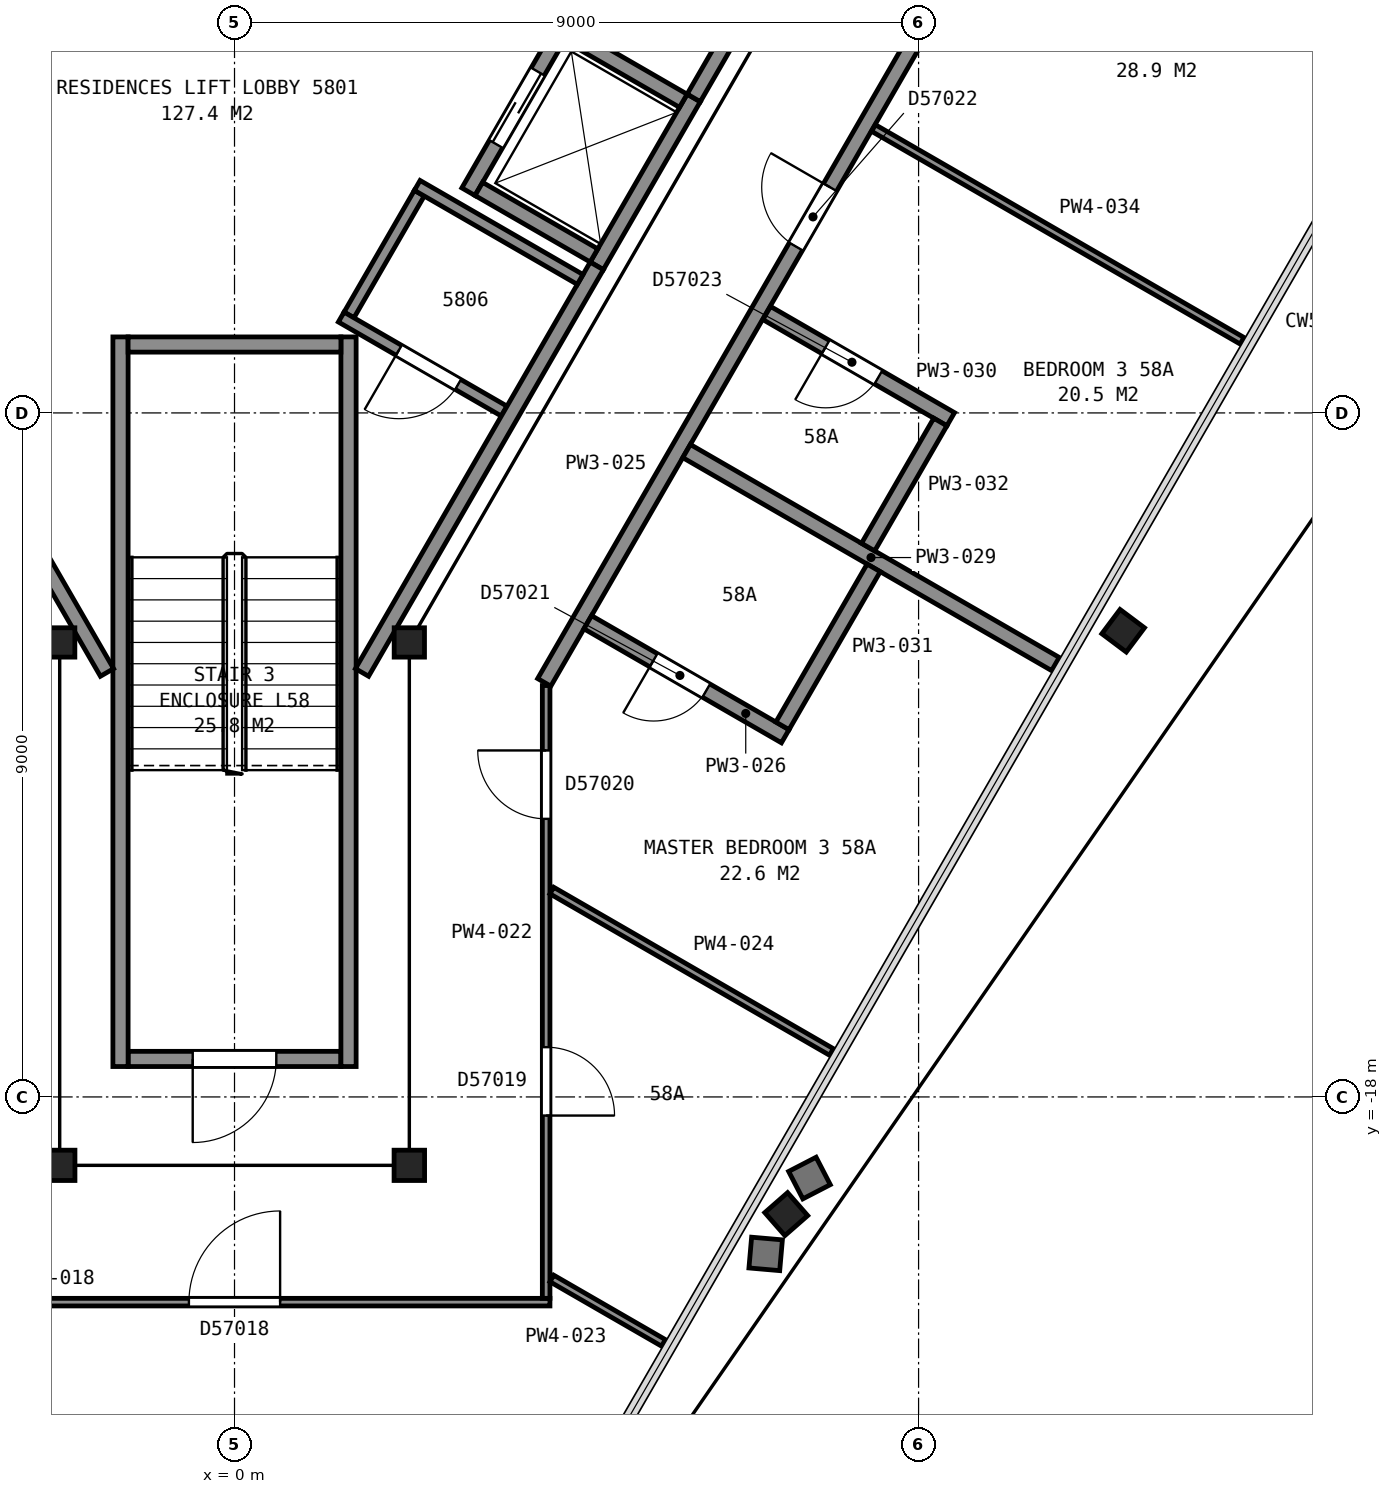
"""IFC4 building model, lengths in metres.
Left out: names, types, materials, properties, quantities, classifications, styles, units other than length and angle.
Written with IfcOpenShell. Run it as: python <this file> out.ifc"""

import sys

from ifc_helpers import new_model, si_unit, direction, frame, frame_2d, origin, origin_2d, place, context, subcontext, project, spatial, rectangle, i_section, extrude, element, fill, save


model = new_model("IFC4")
c1 = context("Model", 3, precision=1e-05, world=origin(), true_north=direction((0.0, 1.0)))
c2 = subcontext(c1, "Body", "Model", "MODEL_VIEW")
j1 = project(units=[si_unit("LENGTHUNIT", "METRE"), si_unit("PLANEANGLEUNIT", "RADIAN")], contexts=[c1])
p1 = place(None, origin())
s1 = spatial("IfcSite", under=j1, at=p1, CompositionType="ELEMENT")
p2 = place(p1, origin())
s2 = spatial("IfcBuilding", under=s1, at=p2, CompositionType="ELEMENT")
p3 = place(p2, frame((0.0, 0.0, 232.3)))
s3 = spatial("IfcBuildingStorey", under=s2, at=p3, CompositionType="ELEMENT", Elevation=232.3)
p4 = place(p3, frame((7.104, -19.365, 0.035), z_axis=(0.129888053343, -0.148415232525, 0.98035810414), x_axis=(-0.498873509398, -0.864253236346, -0.064742297498)))
e1 = element("IfcColumn", 1, at=p4, inside=s3, PredefinedType="COLUMN", context=c2, shape_type="SweptSolid", body=[
    extrude(i_section(OverallWidth=0.401, OverallDepth=0.399, WebThickness=0.025, FlangeThickness=0.04, FilletRadius=0.015, at=origin_2d()), origin(), (0.0, 0.0, 1.0), 3.703),
])
p5 = place(p3, frame((11.515, -11.734, 0.035), z_axis=(0.148684508118, -0.11154642209, 0.982573311649), x_axis=(-0.499994347872, -0.865733149293, -0.022622252559)))
e2 = element("IfcColumn", 2, at=p5, inside=s3, PredefinedType="COLUMN", context=c2, shape_type="SweptSolid", body=[
    extrude(i_section(OverallWidth=0.401, OverallDepth=0.399, WebThickness=0.025, FlangeThickness=0.04, FilletRadius=0.015, at=origin_2d()), origin(), (0.0, 0.0, 1.0), 3.695),
])
p6 = place(p3, frame((-2.3, -12.02, 0.0), z_axis=(0.0, 0.0, 1.0), x_axis=(1.0, 0.0, 0.0)))
e3 = element("IfcColumn", 3, at=p6, inside=s3, PredefinedType="COLUMN", context=c2, shape_type="SweptSolid", body=[
    extrude(i_section(OverallWidth=0.399, OverallDepth=0.386, WebThickness=0.021, FlangeThickness=0.033, FilletRadius=0.015, at=origin_2d()), origin(), (0.0, 0.0, 1.0), 3.7),
])
for number, where, z_axis, x_axis in (
    (4, (-2.3, -18.9, 0.0), (0.0, 0.0, 1.0), (-1.0, 0.0, 0.0)),
    (5, (2.3, -18.9, 0.0), (0.0, 0.0, 1.0), (-1.0, 0.0, 0.0)),
):
    element("IfcColumn", number, at=place(p3, frame(where, z_axis=z_axis, x_axis=x_axis)), inside=s3, PredefinedType="COLUMN", context=c2, shape_type="SweptSolid", body=[
        extrude(i_section(OverallWidth=0.401, OverallDepth=0.399, WebThickness=0.025, FlangeThickness=0.04, FilletRadius=0.015, at=origin_2d()), origin(), (0.0, 0.0, 1.0), 3.7),
    ])
p7 = place(p3, frame((2.3, -12.02, 0.0), z_axis=(0.0, 0.0, 1.0), x_axis=(1.0, 0.0, 0.0)))
e6 = element("IfcColumn", 6, at=p7, inside=s3, PredefinedType="COLUMN", context=c2, shape_type="SweptSolid", body=[
    extrude(i_section(OverallWidth=0.399, OverallDepth=0.386, WebThickness=0.021, FlangeThickness=0.033, FilletRadius=0.015, at=origin_2d()), origin(), (0.0, 0.0, 1.0), 3.7),
])
p8 = place(p3, frame((-1.4, -17.5, 0.0), z_axis=(0.0, 0.0, 1.0), x_axis=(1.0, 0.0, 0.0)))
e7 = element("IfcWall", 7, at=p8, inside=s3, PredefinedType="PARTITIONING", context=c2, shape_type="SweptSolid", body=[
    extrude(rectangle(XDim=2.8, YDim=0.2, at=frame_2d((1.4, 0.0))), origin(), (0.0, 0.0, 1.0), 3.45),
])
p9 = place(p8, frame((0.85, 0.0, 0.0)))
e8 = element("IfcOpeningElement", 8, at=p9, cuts=e7, PredefinedType="OPENING", context=c2, shape_type="SweptSolid", body=[
    extrude(rectangle(XDim=1.1, YDim=2.1, at=frame_2d((0.55, 1.05))), frame((0.0, 0.11, 0.0), z_axis=(0.0, -1.0, 0.0), x_axis=(1.0, 0.0, 0.0)), (0.0, 0.0, 1.0), 0.22),
])
for number, where, z_axis, x_axis in (
    (9, (1.5, -8.0, 0.0), (0.0, 0.0, 1.0), (0.0, -1.0, 0.0)),
    (10, (-1.5, -8.0, 0.0), (0.0, 0.0, 1.0), (0.0, -1.0, 0.0)),
):
    element("IfcWall", number, at=place(p3, frame(where, z_axis=z_axis, x_axis=x_axis)), inside=s3, PredefinedType="PARTITIONING", context=c2, shape_type="SweptSolid", body=[
        extrude(rectangle(XDim=9.6, YDim=0.2, at=frame_2d((4.8, 0.0))), origin(), (0.0, 0.0, 1.0), 3.45),
    ])
p10 = place(p3, frame((-1.4, -8.1, 0.0), z_axis=(0.0, 0.0, 1.0), x_axis=(1.0, 0.0, 0.0)))
e11 = element("IfcWall", 11, at=p10, inside=s3, PredefinedType="PARTITIONING", context=c2, shape_type="SweptSolid", body=[
    extrude(rectangle(XDim=2.8, YDim=0.2, at=frame_2d((1.4, 0.0))), origin(), (0.0, 0.0, 1.0), 3.45),
])
p11 = place(p3, frame((4.766, -7.065, 0.0), z_axis=(0.0, 0.0, 1.0), x_axis=(0.499948979701, 0.866054858364, 0.0)))
e12 = element("IfcWall", 12, at=p11, inside=s3, PredefinedType="PARTITIONING", context=c2, shape_type="SweptSolid", body=[
    extrude(rectangle(XDim=2.55, YDim=0.2, at=frame_2d((1.275, 0.0))), origin(), (0.0, 0.0, 1.0), 3.7),
])
p12 = place(p3, frame((3.077, -6.09, 0.0), z_axis=(0.0, 0.0, 1.0), x_axis=(0.500062241894, 0.865989465428, 0.0)))
e13 = element("IfcWall", 13, at=p12, inside=s3, PredefinedType="PARTITIONING", context=c2, shape_type="SweptSolid", body=[
    extrude(rectangle(XDim=2.55, YDim=0.2, at=frame_2d((1.275, 0.0))), origin(), (0.0, 0.0, 1.0), 3.7),
])
p13 = place(p12, frame((0.725, 0.0, 0.0)))
e14 = element("IfcOpeningElement", 14, at=p13, cuts=e13, PredefinedType="OPENING", context=c2, shape_type="SweptSolid", body=[
    extrude(rectangle(XDim=1.1, YDim=2.1, at=frame_2d((0.55, 1.05))), frame((0.0, 0.11, 0.0), z_axis=(0.0, -1.0, 0.0), x_axis=(1.0, 0.0, 0.0)), (0.0, 0.0, 1.0), 0.22),
])
p14 = place(p3, frame((5.905, -4.893, 0.0), z_axis=(0.0, 0.0, 1.0), x_axis=(-0.866002029911, 0.500040482552, 0.0)))
e15 = element("IfcWall", 15, at=p14, inside=s3, PredefinedType="PARTITIONING", context=c2, shape_type="SweptSolid", body=[
    extrude(rectangle(XDim=1.75, YDim=0.2, at=frame_2d((0.875, 0.0))), origin(), (0.0, 0.0, 1.0), 3.7),
])
p15 = place(p3, frame((4.73, -6.928, 0.0), z_axis=(0.0, 0.0, 1.0), x_axis=(-0.866036909293, 0.499980071345, 0.0)))
e16 = element("IfcWall", 16, at=p15, inside=s3, PredefinedType="PARTITIONING", context=c2, shape_type="SweptSolid", body=[
    extrude(rectangle(XDim=1.75, YDim=0.2, at=frame_2d((0.875, 0.0))), origin(), (0.0, 0.0, 1.0), 3.7),
])
p16 = place(p3, frame((-4.655, -7.257, 0.0), z_axis=(0.0, 0.0, 1.0), x_axis=(0.499966124405, -0.866044960985, 0.0)))
e17 = element("IfcWall", 17, at=p16, inside=s3, PredefinedType="PARTITIONING", context=c2, shape_type="SweptSolid", body=[
    extrude(rectangle(XDim=5.956, YDim=0.2, at=frame_2d((2.978, 0.0))), origin(), (0.0, 0.0, 1.0), 3.45),
])
p17 = place(p16, frame((0.45, 0.0, 0.0)))
e18 = element("IfcOpeningElement", 18, at=p17, cuts=e17, PredefinedType="OPENING", context=c2, shape_type="SweptSolid", body=[
    extrude(rectangle(XDim=1.8, YDim=2.1, at=frame_2d((0.9, 1.05))), frame((0.0, 0.11, 0.0), z_axis=(0.0, -1.0, 0.0), x_axis=(1.0, 0.0, 0.0)), (0.0, 0.0, 1.0), 0.22),
])
p18 = place(p3, frame((1.507, -7.711, 0.0), z_axis=(0.0, 0.0, 1.0), x_axis=(0.49994333299, 0.866058118026, 0.0)))
e19 = element("IfcWall", 19, at=p18, inside=s3, PredefinedType="PARTITIONING", context=c2, shape_type="SweptSolid", body=[
    extrude(rectangle(XDim=1.85, YDim=0.15, at=frame_2d((0.925, 0.0))), origin(), (0.0, 0.0, 1.0), 3.45),
])
p19 = place(p3, frame((1.404, -7.739, 0.0), z_axis=(0.0, 0.0, 1.0), x_axis=(0.866006523861, -0.500032699561, 0.0)))
e20 = element("IfcWall", 20, at=p19, inside=s3, PredefinedType="PARTITIONING", context=c2, shape_type="SweptSolid", body=[
    extrude(rectangle(XDim=2.475, YDim=0.15, at=frame_2d((1.237, 0.0))), origin(), (0.0, 0.0, 1.0), 3.45),
])
p20 = place(p19, frame((0.875, 0.0, 0.0)))
e21 = element("IfcOpeningElement", 21, at=p20, cuts=e20, PredefinedType="OPENING", context=c2, shape_type="SweptSolid", body=[
    extrude(rectangle(XDim=0.9, YDim=2.1, at=frame_2d((0.45, 1.05))), frame((0.0, 0.085, 0.0), z_axis=(0.0, -1.0, 0.0), x_axis=(1.0, 0.0, 0.0)), (0.0, 0.0, 1.0), 0.17),
])
p21 = place(p3, frame((1.677, -12.415, 0.0), z_axis=(0.0, 0.0, 1.0), x_axis=(0.500054337157, 0.865994029939, 0.0)))
e22 = element("IfcWall", 22, at=p21, inside=s3, PredefinedType="PARTITIONING", context=c2, shape_type="SweptSolid", body=[
    extrude(rectangle(XDim=6.177, YDim=0.2, at=frame_2d((3.088, 0.0))), origin(), (0.0, 0.0, 1.0), 3.45),
])
p22 = place(p3, frame((2.404, -6.007, 0.0), z_axis=(0.0, 0.0, 1.0), x_axis=(0.86604923931, -0.499958713387, 0.0)))
e23 = element("IfcWall", 23, at=p22, inside=s3, PredefinedType="PARTITIONING", context=c2, shape_type="SweptSolid", body=[
    extrude(rectangle(XDim=2.475, YDim=0.15, at=frame_2d((1.237, 0.0))), origin(), (0.0, 0.0, 1.0), 3.45),
])
p23 = place(p3, frame((6.042, -4.855, 0.0), z_axis=(0.0, 0.0, 1.0), x_axis=(0.500252727967, 0.865879442048, 0.0)))
e24 = element("IfcWall", 24, at=p23, inside=s3, PredefinedType="PARTITIONING", context=c2, shape_type="SweptSolid", body=[
    extrude(rectangle(XDim=2.617, YDim=0.2, at=frame_2d((1.309, 0.0))), origin(), (0.0, 0.0, 1.0), 3.45),
])
p24 = place(p3, frame((4.15, -20.7, 0.0), z_axis=(0.0, 0.0, 1.0), x_axis=(-1.0, 0.0, 0.0)))
e25 = element("IfcWall", 25, at=p24, inside=s3, PredefinedType="PARTITIONING", context=c2, shape_type="SweptSolid", body=[
    extrude(rectangle(XDim=8.3, YDim=0.1, at=frame_2d((4.15, 0.0))), origin(), (0.0, 0.0, 1.0), 2.713),
])
p25 = place(p24, frame((3.55, 0.0, 0.0)))
e26 = element("IfcOpeningElement", 26, at=p25, cuts=e25, PredefinedType="OPENING", context=c2, shape_type="SweptSolid", body=[
    extrude(rectangle(XDim=1.2, YDim=2.1, at=frame_2d((0.6, 1.05))), frame((0.0, 0.06, 0.0), z_axis=(0.0, -1.0, 0.0), x_axis=(1.0, 0.0, 0.0)), (0.0, 0.0, 1.0), 0.12),
])
p26 = place(p3, frame((4.1, -12.587, 0.0), z_axis=(0.0, 0.0, 1.0), x_axis=(0.0, -1.0, 0.0)))
e27 = element("IfcWall", 27, at=p26, inside=s3, PredefinedType="PARTITIONING", context=c2, shape_type="SweptSolid", body=[
    extrude(rectangle(XDim=8.063, YDim=0.1, at=frame_2d((4.031, 0.0))), origin(), (0.0, 0.0, 1.0), 2.713),
])
p27 = place(p26, frame((4.758, 0.0, 0.0)))
e28 = element("IfcOpeningElement", 28, at=p27, cuts=e27, PredefinedType="OPENING", context=c2, shape_type="SweptSolid", body=[
    extrude(rectangle(XDim=0.9, YDim=2.1, at=frame_2d((0.45, 1.05))), frame((0.0, 0.06, 0.0), z_axis=(0.0, -1.0, 0.0), x_axis=(1.0, 0.0, 0.0)), (0.0, 0.0, 1.0), 0.12),
])
p28 = place(p26, frame((0.854, 0.0, 0.0)))
e29 = element("IfcOpeningElement", 29, at=p28, cuts=e27, PredefinedType="OPENING", context=c2, shape_type="SweptSolid", body=[
    extrude(rectangle(XDim=0.9, YDim=2.1, at=frame_2d((0.45, 1.05))), frame((0.0, 0.06, 0.0), z_axis=(0.0, -1.0, 0.0), x_axis=(1.0, 0.0, 0.0)), (0.0, 0.0, 1.0), 0.12),
])
p29 = place(p3, frame((4.175, -20.388, 0.0), z_axis=(0.0, 0.0, 1.0), x_axis=(0.866046548355, -0.49996337474, 0.0)))
e30 = element("IfcWall", 30, at=p29, inside=s3, PredefinedType="PARTITIONING", context=c2, shape_type="SweptSolid", body=[
    extrude(rectangle(XDim=1.696, YDim=0.1, at=frame_2d((0.848, 0.0))), origin(), (0.0, 0.0, 1.0), 2.713),
])
p30 = place(p3, frame((4.175, -15.284, 0.0), z_axis=(0.0, 0.0, 1.0), x_axis=(0.86603819212, -0.4999778493, 0.0)))
e31 = element("IfcWall", 31, at=p30, inside=s3, PredefinedType="PARTITIONING", context=c2, shape_type="SweptSolid", body=[
    extrude(rectangle(XDim=4.248, YDim=0.1, at=frame_2d((2.124, 0.0))), origin(), (0.0, 0.0, 1.0), 2.713),
])
p31 = place(p3, frame((12.903, 2.745, 0.0), z_axis=(0.0, 0.0, 1.0), x_axis=(-0.499999743747, -0.866025551732, 0.0)))
e32 = element("IfcWall", 32, at=p31, inside=s3, PredefinedType="PARTITIONING", context=c2, shape_type="SweptSolid", body=[
    extrude(rectangle(XDim=17.656, YDim=0.2, at=frame_2d((8.828, 0.0))), origin(), (0.0, 0.0, 1.0), 2.713),
])
p32 = place(p31, frame((10.134, 0.0, 0.0)))
e33 = element("IfcOpeningElement", 33, at=p32, cuts=e32, PredefinedType="OPENING", context=c2, shape_type="SweptSolid", body=[
    extrude(rectangle(XDim=0.9, YDim=2.1, at=frame_2d((0.45, 1.05))), frame((0.0, 0.11, 0.0), z_axis=(0.0, -1.0, 0.0), x_axis=(1.0, 0.0, 0.0)), (0.0, 0.0, 1.0), 0.22),
])
p33 = place(p31, frame((6.073, 0.0, 0.0)))
e34 = element("IfcOpeningElement", 34, at=p33, cuts=e32, PredefinedType="OPENING", context=c2, shape_type="SweptSolid", body=[
    extrude(rectangle(XDim=0.9, YDim=2.1, at=frame_2d((0.45, 1.05))), frame((0.0, 0.11, 0.0), z_axis=(0.0, -1.0, 0.0), x_axis=(1.0, 0.0, 0.0)), (0.0, 0.0, 1.0), 0.22),
])
p34 = place(p3, frame((4.648, -11.754, 0.0), z_axis=(0.0, 0.0, 1.0), x_axis=(0.866010750942, -0.50002537861, 0.0)))
e35 = element("IfcWall", 35, at=p34, inside=s3, PredefinedType="PARTITIONING", context=c2, shape_type="SweptSolid", body=[
    extrude(rectangle(XDim=3.0, YDim=0.2, at=frame_2d((1.5, 0.0))), origin(), (0.0, 0.0, 1.0), 2.713),
])
p35 = place(p34, frame((1.0, 0.0, 0.0)))
e36 = element("IfcOpeningElement", 36, at=p35, cuts=e35, PredefinedType="OPENING", context=c2, shape_type="SweptSolid", body=[
    extrude(rectangle(XDim=0.8, YDim=2.1, at=frame_2d((0.4, 1.05))), frame((0.0, 0.11, 0.0), z_axis=(0.0, -1.0, 0.0), x_axis=(1.0, 0.0, 0.0)), (0.0, 0.0, 1.0), 0.22),
])
p36 = place(p3, frame((5.948, -9.502, 0.0), z_axis=(0.0, 0.0, 1.0), x_axis=(0.866028157966, -0.499995229588, 0.0)))
e37 = element("IfcWall", 37, at=p36, inside=s3, PredefinedType="PARTITIONING", context=c2, shape_type="SweptSolid", body=[
    extrude(rectangle(XDim=5.604, YDim=0.2, at=frame_2d((2.802, 0.0))), origin(), (0.0, 0.0, 1.0), 2.713),
])
p37 = place(p3, frame((9.423, -9.083, 0.0), z_axis=(0.0, 0.0, 1.0), x_axis=(-0.866041588165, 0.499971966783, 0.0)))
e38 = element("IfcWall", 38, at=p37, inside=s3, PredefinedType="PARTITIONING", context=c2, shape_type="SweptSolid", body=[
    extrude(rectangle(XDim=2.795, YDim=0.2, at=frame_2d((1.397, 0.0))), origin(), (0.0, 0.0, 1.0), 2.713),
])
p38 = place(p37, frame((1.1, 0.0, 0.0)))
e39 = element("IfcOpeningElement", 39, at=p38, cuts=e38, PredefinedType="OPENING", context=c2, shape_type="SweptSolid", body=[
    extrude(rectangle(XDim=0.8, YDim=2.1, at=frame_2d((0.4, 1.05))), frame((0.0, 0.11, 0.0), z_axis=(0.0, -1.0, 0.0), x_axis=(1.0, 0.0, 0.0)), (0.0, 0.0, 1.0), 0.22),
])
p39 = place(p3, frame((7.209, -13.117, 0.0), z_axis=(0.0, 0.0, 1.0), x_axis=(0.499913221443, 0.866075499611, 0.0)))
e40 = element("IfcWall", 40, at=p39, inside=s3, PredefinedType="PARTITIONING", context=c2, shape_type="SweptSolid", body=[
    extrude(rectangle(XDim=2.4, YDim=0.2, at=frame_2d((1.2, 0.0))), origin(), (0.0, 0.0, 1.0), 2.713),
])
p40 = place(p3, frame((8.336, -10.765, 0.0), z_axis=(0.0, 0.0, 1.0), x_axis=(0.499911523785, 0.866076479525, 0.0)))
e41 = element("IfcWall", 41, at=p40, inside=s3, PredefinedType="PARTITIONING", context=c2, shape_type="SweptSolid", body=[
    extrude(rectangle(XDim=1.9, YDim=0.2, at=frame_2d((0.95, 0.0))), origin(), (0.0, 0.0, 1.0), 2.713),
])
p41 = place(p3, frame((8.407, -5.251, 0.0), z_axis=(0.0, 0.0, 1.0), x_axis=(0.866061432277, -0.499937591627, 0.0)))
e42 = element("IfcWall", 42, at=p41, inside=s3, PredefinedType="PARTITIONING", context=c2, shape_type="SweptSolid", body=[
    extrude(rectangle(XDim=5.599, YDim=0.1, at=frame_2d((2.8, 0.0))), origin(), (0.0, 0.0, 1.0), 2.713),
])
p42 = place(p9, origin())
e43 = element("IfcDoor", 43, at=p42, inside=s3, OperationType="SINGLE_SWING_LEFT", PredefinedType="DOOR", context=c2, shape_type="SweptSolid", body=[
    extrude(rectangle(XDim=1.1, YDim=2.1, at=frame_2d((0.55, 1.05))), frame((0.0, 0.025, 0.0), z_axis=(0.0, -1.0, 0.0), x_axis=(1.0, 0.0, 0.0)), (0.0, 0.0, 1.0), 0.05),
])
fill(e8, e43)
p43 = place(p13, origin())
e44 = element("IfcDoor", 44, at=p43, inside=s3, OperationType="SLIDING_TO_LEFT", PredefinedType="DOOR", context=c2, shape_type="SweptSolid", body=[
    extrude(rectangle(XDim=1.1, YDim=2.1, at=frame_2d((0.55, 1.05))), frame((0.0, 0.025, 0.0), z_axis=(0.0, -1.0, 0.0), x_axis=(1.0, 0.0, 0.0)), (0.0, 0.0, 1.0), 0.05),
])
fill(e14, e44)
p44 = place(p20, origin())
e45 = element("IfcDoor", 45, at=p44, inside=s3, OperationType="SINGLE_SWING_LEFT", PredefinedType="DOOR", context=c2, shape_type="SweptSolid", body=[
    extrude(rectangle(XDim=0.9, YDim=2.1, at=frame_2d((0.45, 1.05))), frame((0.0, 0.025, 0.0), z_axis=(0.0, -1.0, 0.0), x_axis=(1.0, 0.0, 0.0)), (0.0, 0.0, 1.0), 0.05),
])
fill(e21, e45)
p45 = place(p25, origin())
e46 = element("IfcDoor", 46, at=p45, inside=s3, OperationType="SINGLE_SWING_LEFT", PredefinedType="DOOR", context=c2, shape_type="SweptSolid", body=[
    extrude(rectangle(XDim=1.2, YDim=2.1, at=frame_2d((0.6, 1.05))), frame((0.0, 0.025, 0.0), z_axis=(0.0, -1.0, 0.0), x_axis=(1.0, 0.0, 0.0)), (0.0, 0.0, 1.0), 0.05),
])
fill(e26, e46)
p46 = place(p27, origin())
e47 = element("IfcDoor", 47, at=p46, inside=s3, OperationType="SINGLE_SWING_RIGHT", PredefinedType="DOOR", context=c2, shape_type="SweptSolid", body=[
    extrude(rectangle(XDim=0.9, YDim=2.1, at=frame_2d((0.45, 1.05))), frame((0.0, 0.025, 0.0), z_axis=(0.0, -1.0, 0.0), x_axis=(1.0, 0.0, 0.0)), (0.0, 0.0, 1.0), 0.05),
])
fill(e28, e47)
p47 = place(p28, origin())
e48 = element("IfcDoor", 48, at=p47, inside=s3, OperationType="SINGLE_SWING_LEFT", PredefinedType="DOOR", context=c2, shape_type="SweptSolid", body=[
    extrude(rectangle(XDim=0.9, YDim=2.1, at=frame_2d((0.45, 1.05))), frame((0.0, 0.025, 0.0), z_axis=(0.0, -1.0, 0.0), x_axis=(1.0, 0.0, 0.0)), (0.0, 0.0, 1.0), 0.05),
])
fill(e29, e48)
p48 = place(p32, origin())
e49 = element("IfcDoor", 49, at=p48, inside=s3, OperationType="SINGLE_SWING_LEFT", PredefinedType="DOOR", context=c2, shape_type="SweptSolid", body=[
    extrude(rectangle(XDim=0.9, YDim=2.1, at=frame_2d((0.45, 1.05))), frame((0.0, 0.025, 0.0), z_axis=(0.0, -1.0, 0.0), x_axis=(1.0, 0.0, 0.0)), (0.0, 0.0, 1.0), 0.05),
])
fill(e33, e49)
p49 = place(p35, origin())
e50 = element("IfcDoor", 50, at=p49, inside=s3, OperationType="SINGLE_SWING_LEFT", PredefinedType="DOOR", context=c2, shape_type="SweptSolid", body=[
    extrude(rectangle(XDim=0.8, YDim=2.1, at=frame_2d((0.4, 1.05))), frame((0.0, 0.025, 0.0), z_axis=(0.0, -1.0, 0.0), x_axis=(1.0, 0.0, 0.0)), (0.0, 0.0, 1.0), 0.05),
])
fill(e36, e50)
p50 = place(p38, origin())
e51 = element("IfcDoor", 51, at=p50, inside=s3, OperationType="SINGLE_SWING_RIGHT", PredefinedType="DOOR", context=c2, shape_type="SweptSolid", body=[
    extrude(rectangle(XDim=0.8, YDim=2.1, at=frame_2d((0.4, 1.05))), frame((0.0, 0.025, 0.0), z_axis=(0.0, -1.0, 0.0), x_axis=(1.0, 0.0, 0.0)), (0.0, 0.0, 1.0), 0.05),
])
fill(e39, e51)
save(model, sys.argv[1])
